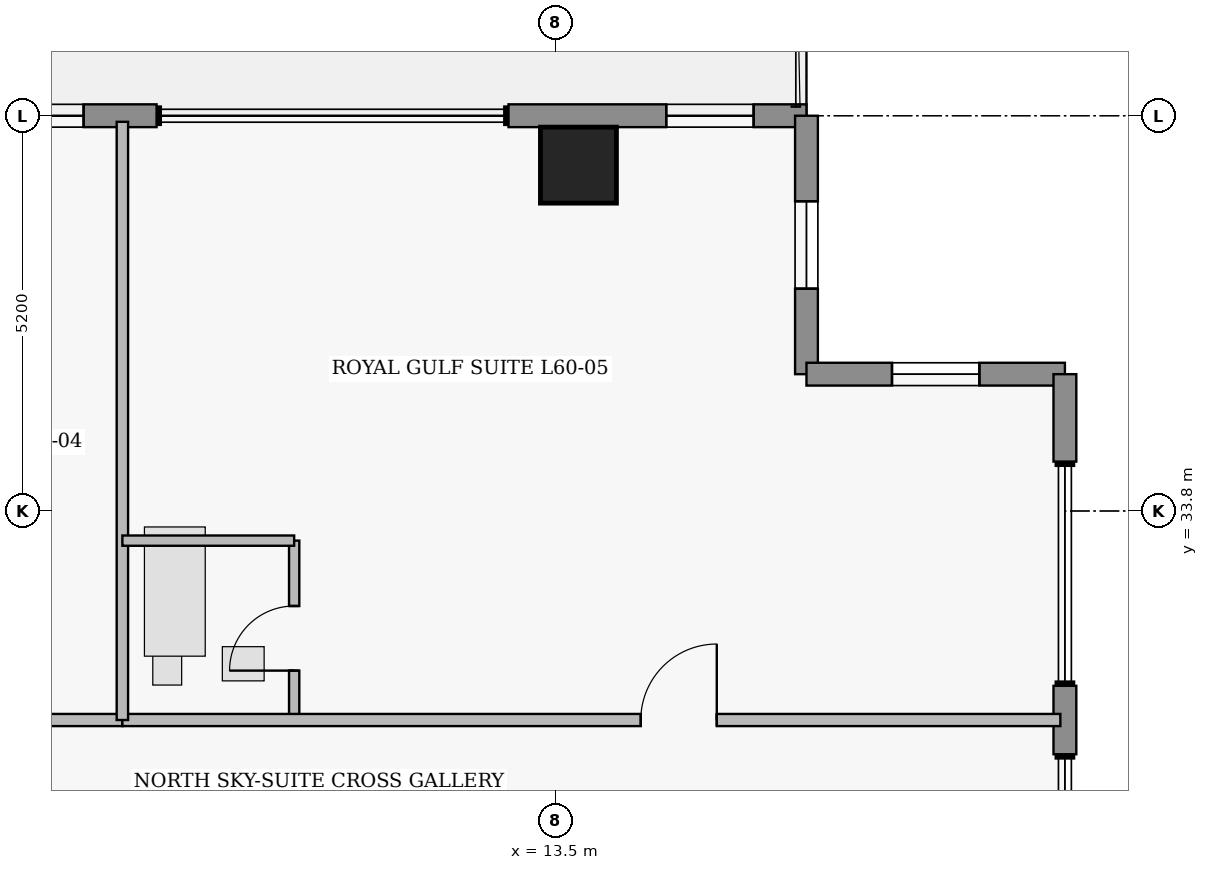
"""IFC4 building model, lengths in metres.
Left out: names, types, materials, properties, quantities, classifications, styles, units other than length and angle.
Written with IfcOpenShell. Run it as: python <this file> out.ifc"""

import sys

from ifc_helpers import new_model, si_unit, direction, frame, frame_2d, origin, origin_2d, place, context, subcontext, project, spatial, rectangle, extrude, element, fill, save


model = new_model("IFC4")
c1 = context("Model", 3, precision=1e-05, world=origin(), true_north=direction((0.0, 1.0)))
c2 = subcontext(c1, "Body", "Model", "MODEL_VIEW")
j1 = project(units=[si_unit("LENGTHUNIT", "METRE"), si_unit("PLANEANGLEUNIT", "RADIAN")], contexts=[c1])
p1 = place(None, origin())
s1 = spatial("IfcSite", under=j1, at=p1, CompositionType="ELEMENT")
p2 = place(p1, origin())
s2 = spatial("IfcBuilding", under=s1, at=p2, CompositionType="ELEMENT")
p3 = place(p2, frame((0.0, 0.0, 239.65)))
s3 = spatial("IfcBuildingStorey", under=s2, at=p3, CompositionType="ELEMENT", Elevation=239.65)
p4 = place(p3, frame((13.8, 38.35, 0.43), z_axis=(0.0, 0.0, 1.0), x_axis=(1.0, 0.0, 0.0)))
e1 = element("IfcColumn", 1, at=p4, inside=s3, PredefinedType="COLUMN", context=c2, shape_type="SweptSolid", body=[
    extrude(rectangle(XDim=1.0, YDim=1.0, at=origin_2d()), origin(), (0.0, 0.0, 1.0), 3.27),
])
p5 = place(p3, frame((-16.8, 39.0, 0.0), z_axis=(0.0, 0.0, 1.0), x_axis=(1.0, 0.0, 0.0)))
e2 = element("IfcWall", 2, at=p5, inside=s3, PredefinedType="STANDARD", context=c2, shape_type="SweptSolid", body=[
    extrude(rectangle(XDim=25.05, YDim=0.3, at=frame_2d((12.525, 0.0))), origin(), (0.0, 0.0, 1.0), 3.48),
])
p6 = place(p5, frame((7.325, 0.0, 0.0)))
e3 = element("IfcOpeningElement", 3, at=p6, cuts=e2, PredefinedType="OPENING", context=c2, shape_type="SweptSolid", body=[
    extrude(rectangle(XDim=1.35, YDim=2.3, at=frame_2d((0.675, 1.15))), frame((0.0, 0.16, 0.0), z_axis=(0.0, -1.0, 0.0), x_axis=(1.0, 0.0, 0.0)), (0.0, 0.0, 1.0), 0.32),
])
p7 = place(p5, frame((15.46, 0.0, 0.85)))
e4 = element("IfcOpeningElement", 4, at=p7, cuts=e2, PredefinedType="OPENING", context=c2, shape_type="SweptSolid", body=[
    extrude(rectangle(XDim=1.6, YDim=1.8, at=frame_2d((0.8, 0.9))), frame((0.0, 0.16, 0.0), z_axis=(0.0, -1.0, 0.0), x_axis=(1.0, 0.0, 0.0)), (0.0, 0.0, 1.0), 0.32),
])
p8 = place(p5, frame((0.695, 0.0, 0.95)))
e5 = element("IfcOpeningElement", 5, at=p8, cuts=e2, PredefinedType="OPENING", context=c2, shape_type="SweptSolid", body=[
    extrude(rectangle(XDim=1.15, YDim=1.55, at=frame_2d((0.575, 0.775))), frame((0.0, 0.16, 0.0), z_axis=(0.0, -1.0, 0.0), x_axis=(1.0, 0.0, 0.0)), (0.0, 0.0, 1.0), 0.32),
])
p9 = place(p5, frame((4.09, 0.0, 0.85)))
e6 = element("IfcOpeningElement", 6, at=p9, cuts=e2, PredefinedType="OPENING", context=c2, shape_type="SweptSolid", body=[
    extrude(rectangle(XDim=1.6, YDim=1.8, at=frame_2d((0.8, 0.9))), frame((0.0, 0.16, 0.0), z_axis=(0.0, -1.0, 0.0), x_axis=(1.0, 0.0, 0.0)), (0.0, 0.0, 1.0), 0.32),
])
p10 = place(p5, frame((9.413, 0.0, 0.85)))
e7 = element("IfcOpeningElement", 7, at=p10, cuts=e2, PredefinedType="OPENING", context=c2, shape_type="SweptSolid", body=[
    extrude(rectangle(XDim=1.6, YDim=1.8, at=frame_2d((0.8, 0.9))), frame((0.0, 0.16, 0.0), z_axis=(0.0, -1.0, 0.0), x_axis=(1.0, 0.0, 0.0)), (0.0, 0.0, 1.0), 0.32),
])
p11 = place(p5, frame((13.48, 0.0, 0.95)))
e8 = element("IfcOpeningElement", 8, at=p11, cuts=e2, PredefinedType="OPENING", context=c2, shape_type="SweptSolid", body=[
    extrude(rectangle(XDim=1.15, YDim=1.55, at=frame_2d((0.575, 0.775))), frame((0.0, 0.16, 0.0), z_axis=(0.0, -1.0, 0.0), x_axis=(1.0, 0.0, 0.0)), (0.0, 0.0, 1.0), 0.32),
])
p12 = place(p5, frame((18.61, 0.0, 0.85)))
e9 = element("IfcOpeningElement", 9, at=p12, cuts=e2, PredefinedType="OPENING", context=c2, shape_type="SweptSolid", body=[
    extrude(rectangle(XDim=1.6, YDim=1.8, at=frame_2d((0.8, 0.9))), frame((0.0, 0.16, 0.0), z_axis=(0.0, -1.0, 0.0), x_axis=(1.0, 0.0, 0.0)), (0.0, 0.0, 1.0), 0.32),
])
p13 = place(p5, frame((22.49, 0.0, 0.85)))
e10 = element("IfcOpeningElement", 10, at=p13, cuts=e2, PredefinedType="OPENING", context=c2, shape_type="SweptSolid", body=[
    extrude(rectangle(XDim=1.6, YDim=1.8, at=frame_2d((0.8, 0.9))), frame((0.0, 0.16, 0.0), z_axis=(0.0, -1.0, 0.0), x_axis=(1.0, 0.0, 0.0)), (0.0, 0.0, 1.0), 0.32),
])
p14 = place(p3, frame((12.88, 39.0, 0.0), z_axis=(0.0, 0.0, 1.0), x_axis=(1.0, 0.0, 0.0)))
e11 = element("IfcWall", 11, at=p14, inside=s3, PredefinedType="STANDARD", context=c2, shape_type="SweptSolid", body=[
    extrude(rectangle(XDim=3.92, YDim=0.3, at=frame_2d((1.96, 0.0))), origin(), (0.0, 0.0, 1.0), 3.48),
])
p15 = place(p14, frame((2.075, 0.0, 0.95)))
e12 = element("IfcOpeningElement", 12, at=p15, cuts=e11, PredefinedType="OPENING", context=c2, shape_type="SweptSolid", body=[
    extrude(rectangle(XDim=1.15, YDim=1.55, at=frame_2d((0.575, 0.775))), frame((0.0, 0.16, 0.0), z_axis=(0.0, -1.0, 0.0), x_axis=(1.0, 0.0, 0.0)), (0.0, 0.0, 1.0), 0.32),
])
p16 = place(p3, frame((16.8, 39.0, 0.0), z_axis=(0.0, 0.0, 1.0), x_axis=(0.0, -1.0, 0.0)))
e13 = element("IfcWall", 13, at=p16, inside=s3, PredefinedType="STANDARD", context=c2, shape_type="SweptSolid", body=[
    extrude(rectangle(XDim=3.4, YDim=0.3, at=frame_2d((1.7, 0.0))), origin(), (0.0, 0.0, 1.0), 3.48),
])
p17 = place(p16, frame((1.125, 0.0, 1.25)))
e14 = element("IfcOpeningElement", 14, at=p17, cuts=e13, PredefinedType="OPENING", context=c2, shape_type="SweptSolid", body=[
    extrude(rectangle(XDim=1.15, YDim=1.55, at=frame_2d((0.575, 0.775))), frame((0.0, 0.16, 0.0), z_axis=(0.0, -1.0, 0.0), x_axis=(1.0, 0.0, 0.0)), (0.0, 0.0, 1.0), 0.32),
])
p18 = place(p3, frame((16.8, 35.6, 0.0), z_axis=(0.0, 0.0, 1.0), x_axis=(1.0, 0.0, 0.0)))
e15 = element("IfcWall", 15, at=p18, inside=s3, PredefinedType="STANDARD", context=c2, shape_type="SweptSolid", body=[
    extrude(rectangle(XDim=3.4, YDim=0.3, at=frame_2d((1.7, 0.0))), origin(), (0.0, 0.0, 1.0), 3.48),
])
p19 = place(p18, frame((1.125, 0.0, 1.25)))
e16 = element("IfcOpeningElement", 16, at=p19, cuts=e15, PredefinedType="OPENING", context=c2, shape_type="SweptSolid", body=[
    extrude(rectangle(XDim=1.15, YDim=1.55, at=frame_2d((0.575, 0.775))), frame((0.0, 0.16, 0.0), z_axis=(0.0, -1.0, 0.0), x_axis=(1.0, 0.0, 0.0)), (0.0, 0.0, 1.0), 0.32),
])
p20 = place(p3, frame((20.2, 35.6, 0.0), z_axis=(0.0, 0.0, 1.0), x_axis=(0.0, -1.0, 0.0)))
e17 = element("IfcWall", 17, at=p20, inside=s3, PredefinedType="STANDARD", context=c2, shape_type="SweptSolid", body=[
    extrude(rectangle(XDim=1.15, YDim=0.3, at=frame_2d((0.575, 0.0))), origin(), (0.0, 0.0, 1.0), 3.48),
])
p21 = place(p3, frame((20.2, 31.5, 0.0), z_axis=(0.0, 0.0, 1.0), x_axis=(0.0, -1.0, 0.0)))
e18 = element("IfcWall", 18, at=p21, inside=s3, PredefinedType="STANDARD", context=c2, shape_type="SweptSolid", body=[
    extrude(rectangle(XDim=0.9, YDim=0.3, at=frame_2d((0.45, 0.0))), origin(), (0.0, 0.0, 1.0), 3.48),
])
p22 = place(p3, frame((1.2, 31.05, 0.0), z_axis=(0.0, 0.0, 1.0), x_axis=(1.0, 0.0, 0.0)))
e19 = element("IfcWall", 19, at=p22, inside=s3, PredefinedType="PARTITIONING", context=c2, shape_type="SweptSolid", body=[
    extrude(rectangle(XDim=6.6, YDim=0.16, at=frame_2d((3.3, 0.0))), origin(), (0.0, 0.0, 1.0), 3.48),
])
p23 = place(p22, frame((3.95, 0.0, 0.0)))
e20 = element("IfcOpeningElement", 20, at=p23, cuts=e19, PredefinedType="OPENING", context=c2, shape_type="SweptSolid", body=[
    extrude(rectangle(XDim=1.0, YDim=2.15, at=frame_2d((0.5, 1.075))), frame((0.0, 0.09, 0.0), z_axis=(0.0, -1.0, 0.0), x_axis=(1.0, 0.0, 0.0)), (0.0, 0.0, 1.0), 0.18),
])
p24 = place(p3, frame((10.06, 31.05, 0.0), z_axis=(0.0, 0.0, 1.0), x_axis=(0.0, 1.0, 0.0)))
e21 = element("IfcWall", 21, at=p24, inside=s3, PredefinedType="PLUMBINGWALL", context=c2, shape_type="SweptSolid", body=[
    extrude(rectangle(XDim=2.36, YDim=0.135, at=frame_2d((1.18, 0.0))), origin(), (0.0, 0.0, 1.0), 3.48),
])
p25 = place(p24, frame((0.65, 0.0, 0.0)))
e22 = element("IfcOpeningElement", 22, at=p25, cuts=e21, PredefinedType="OPENING", context=c2, shape_type="SweptSolid", body=[
    extrude(rectangle(XDim=0.85, YDim=2.1, at=frame_2d((0.425, 1.05))), frame((0.0, 0.077, 0.0), z_axis=(0.0, -1.0, 0.0), x_axis=(1.0, 0.0, 0.0)), (0.0, 0.0, 1.0), 0.155),
])
p26 = place(p3, frame((7.8, 31.05, 0.0), z_axis=(0.0, 0.0, 1.0), x_axis=(1.0, 0.0, 0.0)))
e23 = element("IfcWall", 23, at=p26, inside=s3, PredefinedType="PARTITIONING", context=c2, shape_type="SweptSolid", body=[
    extrude(rectangle(XDim=12.34, YDim=0.16, at=frame_2d((6.17, 0.0))), origin(), (0.0, 0.0, 1.0), 3.48),
])
p27 = place(p26, frame((6.82, 0.0, 0.0)))
e24 = element("IfcOpeningElement", 24, at=p27, cuts=e23, PredefinedType="OPENING", context=c2, shape_type="SweptSolid", body=[
    extrude(rectangle(XDim=1.0, YDim=2.15, at=frame_2d((0.5, 1.075))), frame((0.0, 0.09, 0.0), z_axis=(0.0, -1.0, 0.0), x_axis=(1.0, 0.0, 0.0)), (0.0, 0.0, 1.0), 0.18),
])
p28 = place(p3, frame((7.8, 31.05, 0.0), z_axis=(0.0, 0.0, 1.0), x_axis=(0.0, 1.0, 0.0)))
e25 = element("IfcWall", 25, at=p28, inside=s3, PredefinedType="PARTITIONING", context=c2, shape_type="SweptSolid", body=[
    extrude(rectangle(XDim=7.87, YDim=0.15, at=frame_2d((3.935, 0.0))), origin(), (0.0, 0.0, 1.0), 3.48),
])
p29 = place(p3, frame((7.8, 33.41, 0.0), z_axis=(0.0, 0.0, 1.0), x_axis=(1.0, 0.0, 0.0)))
e26 = element("IfcWall", 26, at=p29, inside=s3, PredefinedType="PLUMBINGWALL", context=c2, shape_type="SweptSolid", body=[
    extrude(rectangle(XDim=2.26, YDim=0.135, at=frame_2d((1.13, 0.0))), origin(), (0.0, 0.0, 1.0), 3.076),
])
p30 = place(p13, origin())
e27 = element("IfcWindow", 27, at=p30, inside=s3, PartitioningType="SINGLE_PANEL", PredefinedType="WINDOW", context=c2, shape_type="SweptSolid", body=[
    extrude(rectangle(XDim=1.6, YDim=1.8, at=frame_2d((0.8, 0.9))), frame((0.0, 0.03, 0.0), z_axis=(0.0, -1.0, 0.0), x_axis=(1.0, 0.0, 0.0)), (0.0, 0.0, 1.0), 0.06),
])
fill(e10, e27)
p31 = place(p15, origin())
e28 = element("IfcWindow", 28, at=p31, inside=s3, PartitioningType="SINGLE_PANEL", PredefinedType="WINDOW", context=c2, shape_type="SweptSolid", body=[
    extrude(rectangle(XDim=1.15, YDim=1.55, at=frame_2d((0.575, 0.775))), frame((0.0, 0.03, 0.0), z_axis=(0.0, -1.0, 0.0), x_axis=(1.0, 0.0, 0.0)), (0.0, 0.0, 1.0), 0.06),
])
fill(e12, e28)
p32 = place(p17, origin())
e29 = element("IfcWindow", 29, at=p32, inside=s3, PartitioningType="SINGLE_PANEL", PredefinedType="WINDOW", context=c2, shape_type="SweptSolid", body=[
    extrude(rectangle(XDim=1.15, YDim=1.55, at=frame_2d((0.575, 0.775))), frame((0.0, 0.03, 0.0), z_axis=(0.0, -1.0, 0.0), x_axis=(1.0, 0.0, 0.0)), (0.0, 0.0, 1.0), 0.06),
])
fill(e14, e29)
p33 = place(p19, origin())
e30 = element("IfcWindow", 30, at=p33, inside=s3, PartitioningType="SINGLE_PANEL", PredefinedType="WINDOW", context=c2, shape_type="SweptSolid", body=[
    extrude(rectangle(XDim=1.15, YDim=1.55, at=frame_2d((0.575, 0.775))), frame((0.0, 0.03, 0.0), z_axis=(0.0, -1.0, 0.0), x_axis=(1.0, 0.0, 0.0)), (0.0, 0.0, 1.0), 0.06),
])
fill(e16, e30)
p34 = place(p25, origin())
e31 = element("IfcDoor", 31, at=p34, inside=s3, OperationType="SINGLE_SWING_LEFT", PredefinedType="DOOR", context=c2, shape_type="SweptSolid", body=[
    extrude(rectangle(XDim=0.85, YDim=2.1, at=frame_2d((0.425, 1.05))), frame((0.0, 0.025, 0.0), z_axis=(0.0, -1.0, 0.0), x_axis=(1.0, 0.0, 0.0)), (0.0, 0.0, 1.0), 0.05),
])
fill(e22, e31)
p35 = place(p27, origin())
e32 = element("IfcDoor", 32, at=p35, inside=s3, OperationType="SINGLE_SWING_RIGHT", PredefinedType="DOOR", context=c2, shape_type="SweptSolid", body=[
    extrude(rectangle(XDim=1.0, YDim=2.15, at=frame_2d((0.5, 1.075))), frame((0.0, 0.025, 0.0), z_axis=(0.0, -1.0, 0.0), x_axis=(1.0, 0.0, 0.0)), (0.0, 0.0, 1.0), 0.05),
])
fill(e24, e32)
save(model, sys.argv[1])
